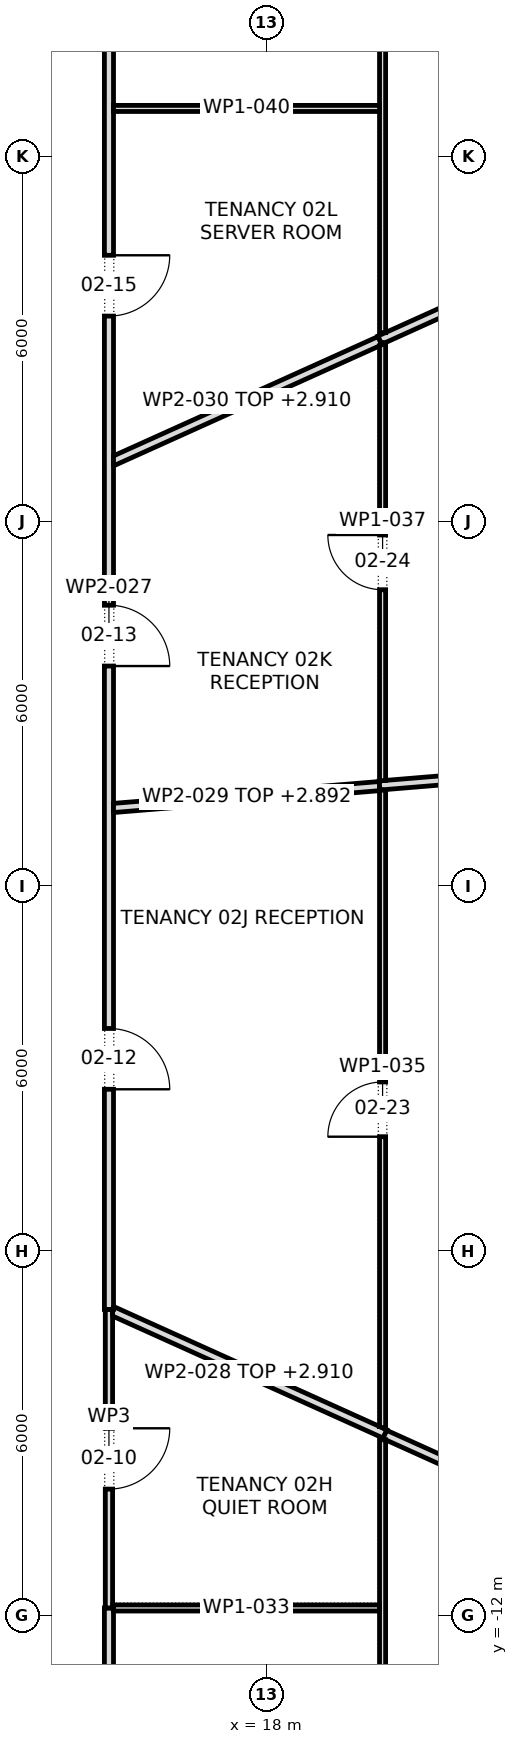
"""IFC4 building model, lengths in metres.
Left out: names, types, materials, properties, quantities, classifications, styles, units other than length and angle.
Written with IfcOpenShell. Run it as: python <this file> out.ifc"""

import sys

from ifc_helpers import new_model, si_unit, direction, frame, frame_2d, origin, place, context, subcontext, project, spatial, polyline, rectangle, outline, extrude, element, fill, save


model = new_model("IFC4")
c1 = context("Model", 3, precision=1e-05, world=origin(), true_north=direction((0.0, 1.0)))
c2 = subcontext(c1, "Body", "Model", "MODEL_VIEW")
j1 = project(units=[si_unit("LENGTHUNIT", "METRE"), si_unit("PLANEANGLEUNIT", "RADIAN")], contexts=[c1])
p1 = place(None, origin())
s1 = spatial("IfcSite", under=j1, at=p1, CompositionType="ELEMENT")
p2 = place(p1, origin())
s2 = spatial("IfcBuilding", under=s1, at=p2, CompositionType="ELEMENT")
p3 = place(p2, frame((0.0, 0.0, 36.1)))
s3 = spatial("IfcBuildingStorey", under=s2, at=p3, CompositionType="ELEMENT", Elevation=36.1)
p4 = place(p3, frame((15.4, -11.87, 0.0), z_axis=(0.0, 0.0, 1.0), x_axis=(0.0, -1.0, 0.0)))
e1 = element("IfcWall", 1, at=p4, inside=s3, PredefinedType="PARTITIONING", context=c2, shape_type="SweptSolid", body=[
    extrude(outline(polyline([(0.0, -0.075), (1.728, -0.075), (3.455, -0.075), (3.605, 0.075), (1.802, 0.075), (0.0, 0.075), (0.0, -0.075)])), origin(), (0.0, 0.0, 1.0), 3.9),
])
p5 = place(p3, frame((15.4, -6.96, 0.0), z_axis=(0.0, 0.0, 1.0), x_axis=(0.0, -1.0, 0.0)))
e2 = element("IfcWall", 2, at=p5, inside=s3, PredefinedType="PARTITIONING", context=c2, shape_type="SweptSolid", body=[
    extrude(rectangle(XDim=4.91, YDim=0.12, at=frame_2d((2.455, 0.0))), origin(), (0.0, 0.0, 1.0), 3.9),
])
p6 = place(p5, frame((1.955, 0.0, 0.0)))
e3 = element("IfcOpeningElement", 3, at=p6, cuts=e2, PredefinedType="OPENING", context=c2, shape_type="SweptSolid", body=[
    extrude(rectangle(XDim=1.0, YDim=2.1, at=frame_2d((0.5, 1.05))), frame((0.0, 0.072, 0.0), z_axis=(0.0, -1.0, 0.0), x_axis=(1.0, 0.0, 0.0)), (0.0, 0.0, 1.0), 0.144),
])
p7 = place(p3, frame((15.4, -6.96, 0.0), z_axis=(0.0, 0.0, 1.0), x_axis=(0.0, 1.0, 0.0)))
e4 = element("IfcWall", 4, at=p7, inside=s3, PredefinedType="PARTITIONING", context=c2, shape_type="SweptSolid", body=[
    extrude(outline(polyline([(0.0, -0.075), (1.87, -0.075), (3.739, -0.075), (5.609, -0.075), (7.478, -0.075), (9.348, -0.075), (11.217, -0.075), (13.087, -0.075), (14.957, -0.075), (16.826, -0.075), (18.696, -0.075), (20.565, -0.075), (22.435, -0.075), (22.285, 0.075), (20.428, 0.075), (18.571, 0.075), (16.714, 0.075), (14.857, 0.075), (13.0, 0.075), (11.143, 0.075), (9.285, 0.075), (7.428, 0.075), (5.571, 0.075), (3.714, 0.075), (1.857, 0.075), (0.0, 0.075), (0.0, -0.075)])), origin(), (0.0, 0.0, 1.0), 3.9),
])
p8 = place(p7, frame((3.62, 0.0, 0.0)))
e5 = element("IfcOpeningElement", 5, at=p8, cuts=e4, PredefinedType="OPENING", context=c2, shape_type="SweptSolid", body=[
    extrude(rectangle(XDim=1.0, YDim=2.1, at=frame_2d((0.5, 1.05))), frame((0.0, 0.087, 0.0), z_axis=(0.0, -1.0, 0.0), x_axis=(1.0, 0.0, 0.0)), (0.0, 0.0, 1.0), 0.174),
])
p9 = place(p7, frame((10.58, 0.0, 0.0)))
e6 = element("IfcOpeningElement", 6, at=p9, cuts=e4, PredefinedType="OPENING", context=c2, shape_type="SweptSolid", body=[
    extrude(rectangle(XDim=1.0, YDim=2.1, at=frame_2d((0.5, 1.05))), frame((0.0, 0.087, 0.0), z_axis=(0.0, -1.0, 0.0), x_axis=(1.0, 0.0, 0.0)), (0.0, 0.0, 1.0), 0.174),
])
p10 = place(p7, frame((16.335, 0.0, 0.0)))
e7 = element("IfcOpeningElement", 7, at=p10, cuts=e4, PredefinedType="OPENING", context=c2, shape_type="SweptSolid", body=[
    extrude(rectangle(XDim=1.0, YDim=2.1, at=frame_2d((0.5, 1.05))), frame((0.0, 0.087, 0.0), z_axis=(0.0, -1.0, 0.0), x_axis=(1.0, 0.0, 0.0)), (0.0, 0.0, 1.0), 0.174),
])
p11 = place(p3, frame((15.444, -6.98, 0.0), z_axis=(0.0, 0.0, 1.0), x_axis=(0.911554382715, -0.411179531778, 0.0)))
e8 = element("IfcWall", 8, at=p11, inside=s3, PredefinedType="PARTITIONING", context=c2, shape_type="SweptSolid", body=[
    extrude(outline(polyline([(0.051, -0.075), (1.678, -0.075), (3.305, -0.075), (4.932, -0.075), (4.932, -0.054), (4.932, 0.075), (4.805, 0.075), (4.801, 0.073), (4.8, 0.075), (3.2, 0.075), (1.6, 0.075), (0.0, 0.075), (0.02, 0.031), (0.006, 0.025), (0.051, -0.075)])), origin(), (0.0, 0.0, 1.0), 2.91),
])
p12 = place(p3, frame((15.469, 1.286, 0.0), z_axis=(0.0, 0.0, 1.0), x_axis=(0.996634800256, 0.081969963512, 0.0)))
e9 = element("IfcWall", 9, at=p12, inside=s3, PredefinedType="PARTITIONING", context=c2, shape_type="SweptSolid", body=[
    extrude(outline(polyline([(0.0, -0.075), (1.463, -0.075), (2.926, -0.075), (4.389, -0.075), (4.389, -0.075), (4.393, -0.075), (4.396, -0.075), (4.396, 0.075), (2.935, 0.075), (1.473, 0.075), (0.012, 0.075), (0.0, -0.07), (0.0, -0.075)])), origin(), (0.0, 0.0, 1.0), 2.892),
])
p13 = place(p3, frame((15.444, 6.98, 0.0), z_axis=(0.0, 0.0, 1.0), x_axis=(0.911543776443, 0.411203044285, 0.0)))
e10 = element("IfcWall", 10, at=p13, inside=s3, PredefinedType="PARTITIONING", context=c2, shape_type="SweptSolid", body=[
    extrude(outline(polyline([(0.0, -0.075), (1.6, -0.075), (3.2, -0.075), (4.8, -0.075), (4.8, -0.074), (4.802, -0.075), (4.842, -0.075), (4.842, 0.075), (3.251, 0.075), (1.659, 0.075), (0.068, 0.075), (0.0, -0.075)])), origin(), (0.0, 0.0, 1.0), 2.91),
])
p14 = place(p3, frame((19.9, -19.95, 0.0), z_axis=(0.0, 0.0, 1.0), x_axis=(0.0, 1.0, 0.0)))
e11 = element("IfcWall", 11, at=p14, inside=s3, PredefinedType="PARTITIONING", context=c2, shape_type="SweptSolid", body=[
    extrude(outline(polyline([(10.846, 0.05), (9.055, 0.05), (7.264, 0.05), (5.473, 0.05), (3.682, 0.05), (1.891, 0.05), (0.1, 0.05), (0.0, -0.05), (1.808, -0.05), (3.615, -0.05), (5.423, -0.05), (7.231, -0.05), (9.039, -0.05), (10.846, -0.05), (10.846, 0.05)])), origin(), (0.0, 0.0, 1.0), 3.9),
])
p15 = place(p14, frame((3.615, 0.0, 0.0)))
e12 = element("IfcOpeningElement", 12, at=p15, cuts=e11, PredefinedType="OPENING", context=c2, shape_type="SweptSolid", body=[
    extrude(rectangle(XDim=0.9, YDim=2.1, at=frame_2d((0.45, 1.05))), frame((0.0, 0.062, 0.0), z_axis=(0.0, -1.0, 0.0), x_axis=(1.0, 0.0, 0.0)), (0.0, 0.0, 1.0), 0.124),
])
p16 = place(p3, frame((19.85, -11.87, 0.0), z_axis=(0.0, 0.0, 1.0), x_axis=(-1.0, 0.0, 0.0)))
e13 = element("IfcWall", 13, at=p16, inside=s3, PredefinedType="PARTITIONING", context=c2, shape_type="SweptSolid", body=[
    extrude(outline(polyline([(4.39, -0.05), (4.39, 0.0), (4.375, 0.0), (4.375, 0.05), (2.917, 0.05), (1.458, 0.05), (0.0, 0.05), (0.0, -0.05), (1.463, -0.05), (2.927, -0.05), (4.39, -0.05)])), origin(), (0.0, 0.0, 1.0), 3.9),
])
p17 = place(p3, frame((19.937, -9.017, 0.0), z_axis=(0.0, 0.0, 1.0), x_axis=(0.911435859514, -0.411442187909, 0.0)))
e14 = element("IfcWall", 14, at=p17, inside=s3, PredefinedType="PARTITIONING", context=c2, shape_type="SweptSolid", body=[
    extrude(outline(polyline([(0.0, -0.075), (0.045, -0.075), (0.048, -0.074), (0.049, -0.075), (2.013, -0.075), (3.978, -0.075), (5.943, -0.075), (7.908, -0.075), (9.873, -0.075), (11.838, -0.075), (11.856, -0.001), (11.858, 0.069), (11.858, 0.075), (9.882, 0.075), (7.906, 0.075), (5.929, 0.075), (3.953, 0.075), (1.976, 0.075), (0.0, 0.075), (0.0, -0.075)])), origin(), (0.0, 0.0, 1.0), 2.91),
])
p18 = place(p3, frame((19.9, 1.588, 0.0), z_axis=(0.0, 0.0, 1.0), x_axis=(0.0, -1.0, 0.0)))
e15 = element("IfcWall", 15, at=p18, inside=s3, PredefinedType="PARTITIONING", context=c2, shape_type="SweptSolid", body=[
    extrude(outline(polyline([(0.018, -0.05), (1.76, -0.05), (3.503, -0.05), (5.246, -0.05), (6.988, -0.05), (8.731, -0.05), (10.473, -0.05), (10.518, 0.049), (10.518, 0.05), (8.765, 0.05), (7.012, 0.05), (5.259, 0.05), (3.506, 0.05), (1.753, 0.05), (0.0, 0.05), (0.0, 0.044), (0.007, -0.043), (0.0, -0.044), (0.0, -0.044), (0.017, -0.043), (0.018, -0.05)])), origin(), (0.0, 0.0, 1.0), 3.9),
])
p19 = place(p18, frame((4.809, 0.0, 0.0)))
e16 = element("IfcOpeningElement", 16, at=p19, cuts=e15, PredefinedType="OPENING", context=c2, shape_type="SweptSolid", body=[
    extrude(rectangle(XDim=0.9, YDim=2.1, at=frame_2d((0.45, 1.05))), frame((0.0, 0.062, 0.0), z_axis=(0.0, -1.0, 0.0), x_axis=(1.0, 0.0, 0.0)), (0.0, 0.0, 1.0), 0.124),
])
p20 = place(p3, frame((19.85, 1.656, 0.0), z_axis=(0.0, 0.0, 1.0), x_axis=(0.996587936268, 0.082537780956, 0.0)))
e17 = element("IfcWall", 17, at=p20, inside=s3, PredefinedType="PARTITIONING", context=c2, shape_type="SweptSolid", body=[
    extrude(outline(polyline([(14.884, -0.075), (14.884, 0.05), (14.881, 0.075), (13.021, 0.075), (11.16, 0.075), (9.3, 0.075), (7.44, 0.075), (5.58, 0.075), (3.72, 0.075), (1.86, 0.075), (0.0, 0.075), (0.0, -0.068), (0.087, -0.075), (1.937, -0.075), (3.786, -0.075), (5.636, -0.075), (7.486, -0.075), (9.335, -0.075), (11.185, -0.075), (13.035, -0.075), (14.884, -0.075)])), origin(), (0.0, 0.0, 1.0), 2.892),
])
p21 = place(p3, frame((19.9, 8.94, 0.0), z_axis=(0.0, 0.0, 1.0), x_axis=(0.0, -1.0, 0.0)))
e18 = element("IfcWall", 18, at=p21, inside=s3, PredefinedType="PARTITIONING", context=c2, shape_type="SweptSolid", body=[
    extrude(outline(polyline([(7.208, -0.05), (7.208, -0.046), (7.201, 0.05), (5.4, 0.05), (3.6, 0.05), (1.8, 0.05), (0.0, 0.05), (0.0, 0.049), (0.029, -0.015), (0.0, -0.028), (0.0, -0.028), (0.037, -0.011), (0.055, -0.05), (1.843, -0.05), (3.632, -0.05), (5.42, -0.05), (7.208, -0.05)])), origin(), (0.0, 0.0, 1.0), 3.9),
])
p22 = place(p21, frame((3.165, 0.0, 0.0)))
e19 = element("IfcOpeningElement", 19, at=p22, cuts=e18, PredefinedType="OPENING", context=c2, shape_type="SweptSolid", body=[
    extrude(rectangle(XDim=0.9, YDim=2.1, at=frame_2d((0.45, 1.05))), frame((0.0, 0.062, 0.0), z_axis=(0.0, -1.0, 0.0), x_axis=(1.0, 0.0, 0.0)), (0.0, 0.0, 1.0), 0.124),
])
p23 = place(p3, frame((19.9, 9.103, 0.0), z_axis=(0.0, 0.0, 1.0), x_axis=(0.0, 1.0, 0.0)))
e20 = element("IfcWall", 20, at=p23, inside=s3, PredefinedType="PARTITIONING", context=c2, shape_type="SweptSolid", body=[
    extrude(outline(polyline([(0.0, -0.05), (1.808, -0.05), (3.616, -0.05), (5.424, -0.05), (7.232, -0.05), (9.04, -0.05), (10.847, -0.05), (10.747, 0.05), (8.956, 0.05), (7.165, 0.05), (5.374, 0.05), (3.583, 0.05), (1.791, 0.05), (0.0, 0.05), (0.0, -0.05)])), origin(), (0.0, 0.0, 1.0), 3.9),
])
p24 = place(p3, frame((19.854, 8.979, 0.0), z_axis=(0.0, 0.0, 1.0), x_axis=(0.911433390516, 0.411447657245, 0.0)))
e21 = element("IfcWall", 21, at=p24, inside=s3, PredefinedType="PARTITIONING", context=c2, shape_type="SweptSolid", body=[
    extrude(outline(polyline([(11.948, -0.075), (11.948, -0.063), (11.946, 0.001), (11.927, 0.075), (9.963, 0.075), (7.998, 0.075), (6.033, 0.075), (4.068, 0.075), (2.104, 0.075), (0.139, 0.075), (0.138, 0.073), (0.133, 0.075), (0.0, 0.075), (0.0, -0.043), (0.07, -0.075), (2.05, -0.075), (4.029, -0.075), (6.009, -0.075), (7.989, -0.075), (9.968, -0.075), (11.948, -0.075)])), origin(), (0.0, 0.0, 1.0), 2.91),
])
p25 = place(p3, frame((19.85, 12.79, 0.0), z_axis=(0.0, 0.0, 1.0), x_axis=(-1.0, 0.0, 0.0)))
e22 = element("IfcWall", 22, at=p25, inside=s3, PredefinedType="PARTITIONING", context=c2, shape_type="SweptSolid", body=[
    extrude(rectangle(XDim=4.375, YDim=0.1, at=frame_2d((2.188, 0.0))), origin(), (0.0, 0.0, 1.0), 3.9),
])
p26 = place(p6, origin())
e23 = element("IfcDoor", 23, at=p26, inside=s3, OperationType="SINGLE_SWING_RIGHT", PredefinedType="DOOR", context=c2, shape_type="SweptSolid", body=[
    extrude(rectangle(XDim=1.0, YDim=2.1, at=frame_2d((0.5, 1.05))), frame((0.0, 0.025, 0.0), z_axis=(0.0, -1.0, 0.0), x_axis=(1.0, 0.0, 0.0)), (0.0, 0.0, 1.0), 0.05),
])
fill(e3, e23)
p27 = place(p8, frame((1.0, 0.0, 0.0), z_axis=(0.0, 0.0, 1.0), x_axis=(-1.0, 0.0, 0.0)))
e24 = element("IfcDoor", 24, at=p27, inside=s3, OperationType="SINGLE_SWING_LEFT", PredefinedType="DOOR", context=c2, shape_type="SweptSolid", body=[
    extrude(rectangle(XDim=1.0, YDim=2.1, at=frame_2d((0.5, 1.05))), frame((0.0, 0.025, 0.0), z_axis=(0.0, -1.0, 0.0), x_axis=(1.0, 0.0, 0.0)), (0.0, 0.0, 1.0), 0.05),
])
fill(e5, e24)
p28 = place(p9, frame((1.0, 0.0, 0.0), z_axis=(0.0, 0.0, 1.0), x_axis=(-1.0, 0.0, 0.0)))
e25 = element("IfcDoor", 25, at=p28, inside=s3, OperationType="SINGLE_SWING_LEFT", PredefinedType="DOOR", context=c2, shape_type="SweptSolid", body=[
    extrude(rectangle(XDim=1.0, YDim=2.1, at=frame_2d((0.5, 1.05))), frame((0.0, 0.025, 0.0), z_axis=(0.0, -1.0, 0.0), x_axis=(1.0, 0.0, 0.0)), (0.0, 0.0, 1.0), 0.05),
])
fill(e6, e25)
p29 = place(p10, frame((1.0, 0.0, 0.0), z_axis=(0.0, 0.0, 1.0), x_axis=(-1.0, 0.0, 0.0)))
e26 = element("IfcDoor", 26, at=p29, inside=s3, OperationType="SINGLE_SWING_RIGHT", PredefinedType="DOOR", context=c2, shape_type="SweptSolid", body=[
    extrude(rectangle(XDim=1.0, YDim=2.1, at=frame_2d((0.5, 1.05))), frame((0.0, 0.025, 0.0), z_axis=(0.0, -1.0, 0.0), x_axis=(1.0, 0.0, 0.0)), (0.0, 0.0, 1.0), 0.05),
])
fill(e7, e26)
p30 = place(p19, frame((0.9, 0.0, 0.0), z_axis=(0.0, 0.0, 1.0), x_axis=(-1.0, 0.0, 0.0)))
e27 = element("IfcDoor", 27, at=p30, inside=s3, OperationType="SINGLE_SWING_RIGHT", PredefinedType="DOOR", context=c2, shape_type="SweptSolid", body=[
    extrude(rectangle(XDim=0.9, YDim=2.1, at=frame_2d((0.45, 1.05))), frame((0.0, 0.025, 0.0), z_axis=(0.0, -1.0, 0.0), x_axis=(1.0, 0.0, 0.0)), (0.0, 0.0, 1.0), 0.05),
])
fill(e16, e27)
p31 = place(p22, frame((0.9, 0.0, 0.0), z_axis=(0.0, 0.0, 1.0), x_axis=(-1.0, 0.0, 0.0)))
e28 = element("IfcDoor", 28, at=p31, inside=s3, OperationType="SINGLE_SWING_LEFT", PredefinedType="DOOR", context=c2, shape_type="SweptSolid", body=[
    extrude(rectangle(XDim=0.9, YDim=2.1, at=frame_2d((0.45, 1.05))), frame((0.0, 0.025, 0.0), z_axis=(0.0, -1.0, 0.0), x_axis=(1.0, 0.0, 0.0)), (0.0, 0.0, 1.0), 0.05),
])
fill(e19, e28)
save(model, sys.argv[1])
